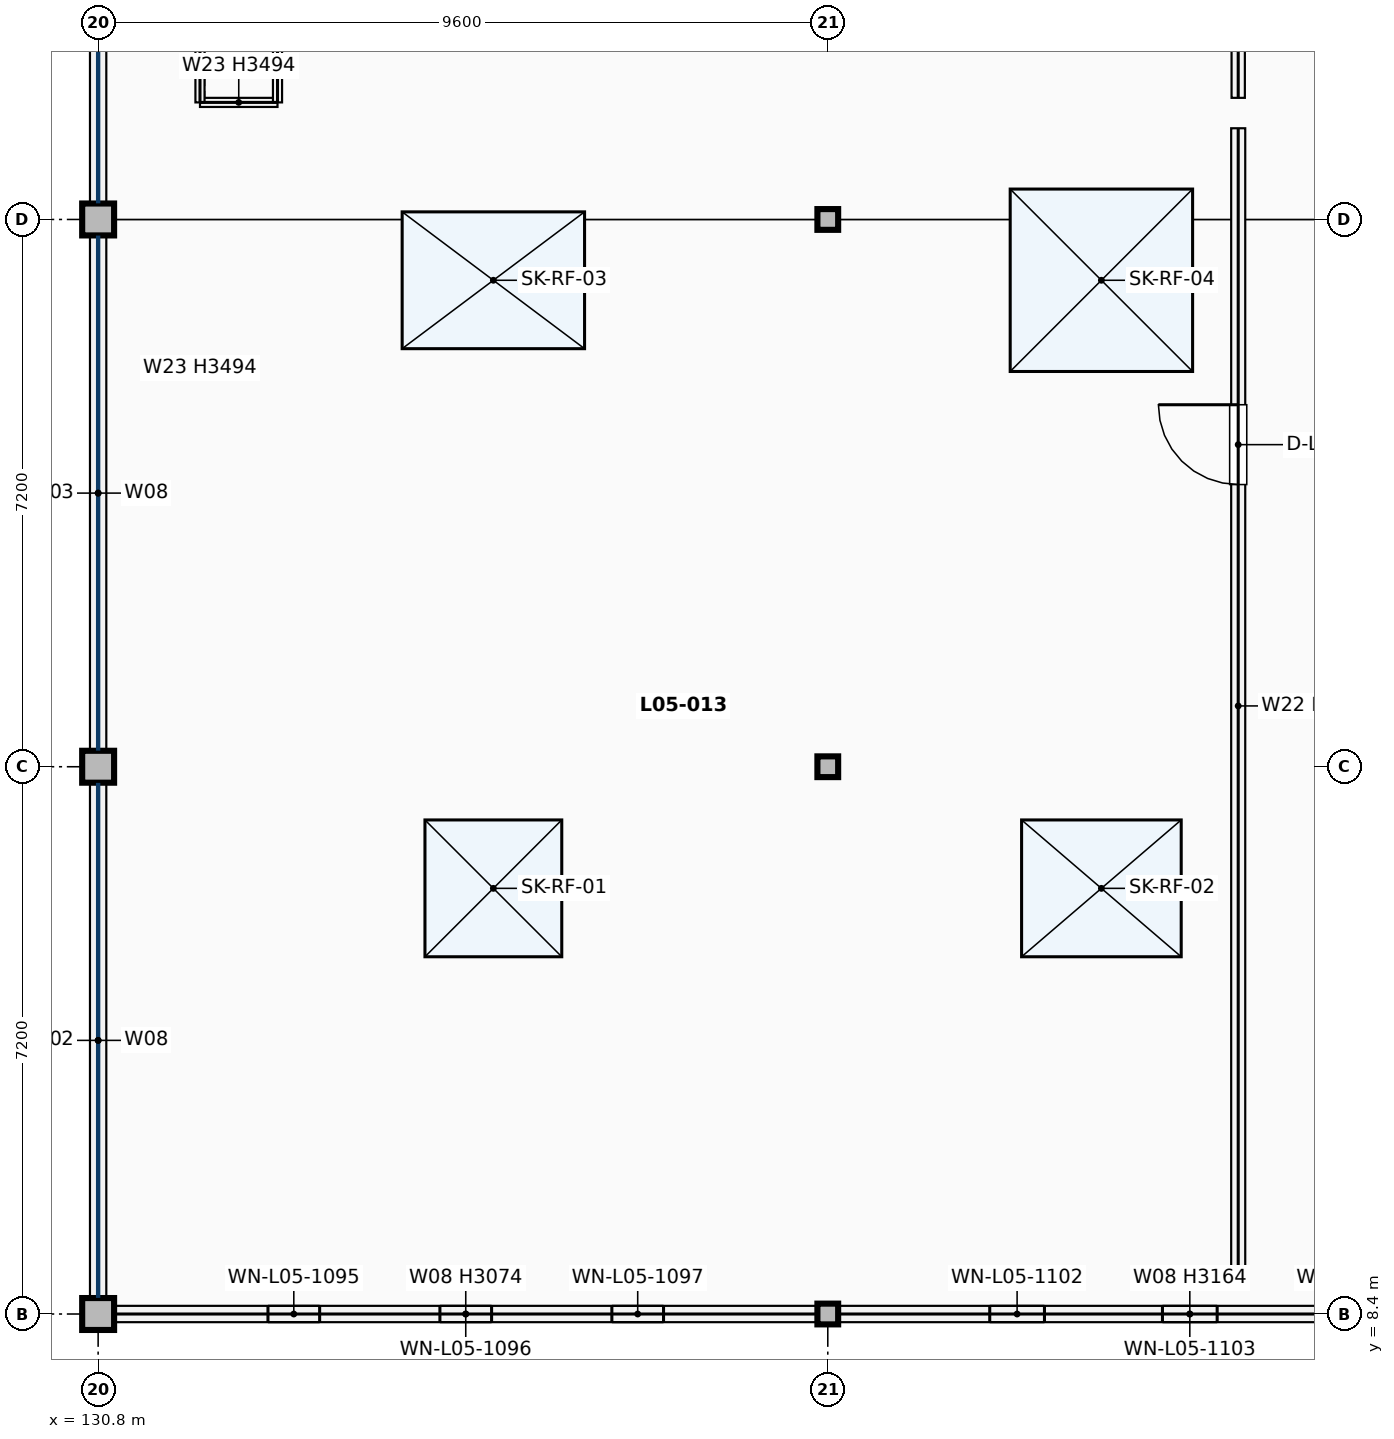
"""IFC4 building model, lengths in metres.
Left out: names, types, materials, properties, quantities, classifications, styles, units other than length and angle.
Written with IfcOpenShell. Run it as: python <this file> out.ifc"""

import sys

from ifc_helpers import new_model, si_unit, direction, frame, frame_2d, origin, origin_2d, place, context, subcontext, project, spatial, rectangle, hollow_circle, extrude, element, fill, save


model = new_model("IFC4")
c1 = context("Model", 3, precision=1e-05, world=origin(), true_north=direction((0.0, 1.0)))
c2 = subcontext(c1, "Body", "Model", "MODEL_VIEW")
j1 = project(units=[si_unit("LENGTHUNIT", "METRE"), si_unit("PLANEANGLEUNIT", "RADIAN")], contexts=[c1])
p1 = place(None, origin())
s1 = spatial("IfcSite", under=j1, at=p1, CompositionType="ELEMENT")
p2 = place(p1, origin())
s2 = spatial("IfcBuilding", under=s1, at=p2, CompositionType="ELEMENT")
p3 = place(p2, frame((0.0, 0.0, 21.08)))
s3 = spatial("IfcBuildingStorey", under=s2, at=p3, CompositionType="ELEMENT", Elevation=21.08)
for number, where, z_axis, x_axis in (
    (1, (130.8, 8.4, 0.0), (0.0, 0.0, 1.0), (1.0, 0.0, 0.0)),
    (2, (130.8, 15.6, 0.0), (0.0, 0.0, 1.0), (1.0, 0.0, 0.0)),
    (3, (130.8, 22.8, 0.0), (0.0, 0.0, 1.0), (1.0, 0.0, 0.0)),
):
    element("IfcColumn", number, at=place(p3, frame(where, z_axis=z_axis, x_axis=x_axis)), inside=s3, PredefinedType="COLUMN", context=c2, shape_type="SweptSolid", body=[
        extrude(rectangle(XDim=0.42, YDim=0.42, at=origin_2d()), origin(), (0.0, 0.0, 1.0), 3.74),
    ])
for number, where, z_axis, x_axis in (
    (4, (140.4, 8.4, 0.0), (0.0, 0.0, 1.0), (1.0, 0.0, 0.0)),
    (5, (140.4, 15.6, 0.0), (0.0, 0.0, 1.0), (1.0, 0.0, 0.0)),
    (6, (140.4, 22.8, 0.0), (0.0, 0.0, 1.0), (1.0, 0.0, 0.0)),
):
    element("IfcColumn", number, at=place(p3, frame(where, z_axis=z_axis, x_axis=x_axis)), inside=s3, PredefinedType="COLUMN", context=c2, shape_type="SweptSolid", body=[
        extrude(hollow_circle(Radius=0.136, WallThickness=0.012, at=origin_2d()), origin(), (0.0, 0.0, 1.0), 3.7),
    ])
for number, where, z_axis, x_axis in (
    (7, (130.8, 8.612, 0.0), (0.0, 0.0, 1.0), (0.0, 1.0, 0.0)),
    (8, (130.8, 15.812, 0.0), (0.0, 0.0, 1.0), (0.0, 1.0, 0.0)),
):
    element("IfcWall", number, at=place(p3, frame(where, z_axis=z_axis, x_axis=x_axis)), inside=s3, PredefinedType="SOLIDWALL", context=c2, shape_type="SweptSolid", body=[
        extrude(rectangle(XDim=6.776, YDim=0.215, at=frame_2d((3.388, 0.0))), origin(), (0.0, 0.0, 1.0), 0.85),
    ])
p4 = place(p3, frame((130.8, 23.012, 0.0), z_axis=(0.0, 0.0, 1.0), x_axis=(0.0, 1.0, 0.0)))
e9 = element("IfcWall", 9, at=p4, inside=s3, PredefinedType="SOLIDWALL", context=c2, shape_type="SweptSolid", body=[
    extrude(rectangle(XDim=6.776, YDim=0.215, at=frame_2d((3.388, 0.0))), origin(), (0.0, 0.0, 1.0), 0.85),
])
p5 = place(p3, frame((131.012, 8.4, 0.0), z_axis=(0.0, 0.0, 1.0), x_axis=(1.0, 0.0, 0.0)))
e10 = element("IfcWall", 10, at=p5, inside=s3, PredefinedType="SOLIDWALL", context=c2, shape_type="SweptSolid", body=[
    extrude(rectangle(XDim=9.25, YDim=0.215, at=frame_2d((4.625, 0.0))), origin(), (0.0, 0.0, 1.0), 3.074),
])
p6 = place(p5, frame((2.022, 0.0, 0.75)))
e11 = element("IfcOpeningElement", 11, at=p6, cuts=e10, PredefinedType="OPENING", context=c2, shape_type="SweptSolid", body=[
    extrude(rectangle(XDim=0.68, YDim=1.96, at=frame_2d((0.34, 0.98))), frame((0.0, 0.118, 0.0), z_axis=(0.0, -1.0, 0.0), x_axis=(1.0, 0.0, 0.0)), (0.0, 0.0, 1.0), 0.235),
])
p7 = place(p5, frame((4.285, 0.0, 0.75)))
e12 = element("IfcOpeningElement", 12, at=p7, cuts=e10, PredefinedType="OPENING", context=c2, shape_type="SweptSolid", body=[
    extrude(rectangle(XDim=0.68, YDim=1.96, at=frame_2d((0.34, 0.98))), frame((0.0, 0.118, 0.0), z_axis=(0.0, -1.0, 0.0), x_axis=(1.0, 0.0, 0.0)), (0.0, 0.0, 1.0), 0.235),
])
p8 = place(p5, frame((6.547, 0.0, 0.75)))
e13 = element("IfcOpeningElement", 13, at=p8, cuts=e10, PredefinedType="OPENING", context=c2, shape_type="SweptSolid", body=[
    extrude(rectangle(XDim=0.68, YDim=1.96, at=frame_2d((0.34, 0.98))), frame((0.0, 0.118, 0.0), z_axis=(0.0, -1.0, 0.0), x_axis=(1.0, 0.0, 0.0)), (0.0, 0.0, 1.0), 0.235),
])
p9 = place(p3, frame((140.539, 8.4, 0.0), z_axis=(0.0, 0.0, 1.0), x_axis=(1.0, 0.0, 0.0)))
e14 = element("IfcWall", 14, at=p9, inside=s3, PredefinedType="SOLIDWALL", context=c2, shape_type="SweptSolid", body=[
    extrude(rectangle(XDim=9.25, YDim=0.215, at=frame_2d((4.625, 0.0))), origin(), (0.0, 0.0, 1.0), 3.164),
])
p10 = place(p9, frame((1.992, 0.0, 0.75)))
e15 = element("IfcOpeningElement", 15, at=p10, cuts=e14, PredefinedType="OPENING", context=c2, shape_type="SweptSolid", body=[
    extrude(rectangle(XDim=0.72, YDim=2.24, at=frame_2d((0.36, 1.12))), frame((0.0, 0.118, 0.0), z_axis=(0.0, -1.0, 0.0), x_axis=(1.0, 0.0, 0.0)), (0.0, 0.0, 1.0), 0.235),
])
p11 = place(p9, frame((4.265, 0.0, 0.75)))
e16 = element("IfcOpeningElement", 16, at=p11, cuts=e14, PredefinedType="OPENING", context=c2, shape_type="SweptSolid", body=[
    extrude(rectangle(XDim=0.72, YDim=2.24, at=frame_2d((0.36, 1.12))), frame((0.0, 0.118, 0.0), z_axis=(0.0, -1.0, 0.0), x_axis=(1.0, 0.0, 0.0)), (0.0, 0.0, 1.0), 0.235),
])
p12 = place(p9, frame((6.537, 0.0, 0.75)))
e17 = element("IfcOpeningElement", 17, at=p12, cuts=e14, PredefinedType="OPENING", context=c2, shape_type="SweptSolid", body=[
    extrude(rectangle(XDim=0.72, YDim=2.24, at=frame_2d((0.36, 1.12))), frame((0.0, 0.118, 0.0), z_axis=(0.0, -1.0, 0.0), x_axis=(1.0, 0.0, 0.0)), (0.0, 0.0, 1.0), 0.235),
])
for number, where, z_axis, x_axis in (
    (18, (132.14, 24.34, 0.0), (0.0, 0.0, 1.0), (1.0, 0.0, 0.0)),
    (19, (133.16, 24.34, 0.0), (0.0, 0.0, 1.0), (0.0, 1.0, 0.0)),
    (20, (132.14, 25.36, 0.0), (0.0, 0.0, 1.0), (0.0, -1.0, 0.0)),
):
    element("IfcWall", number, at=place(p3, frame(where, z_axis=z_axis, x_axis=x_axis)), inside=s3, PredefinedType="PARTITIONING", context=c2, shape_type="SweptSolid", body=[
        extrude(rectangle(XDim=1.02, YDim=0.12, at=frame_2d((0.51, 0.0))), origin(), (0.0, 0.0, 1.0), 3.494),
    ])
p13 = place(p3, frame((145.8, 8.8, 0.0), z_axis=(0.0, 0.0, 1.0), x_axis=(0.0, 1.0, 0.0)))
e21 = element("IfcWall", 21, at=p13, inside=s3, PredefinedType="PARTITIONING", context=c2, shape_type="SweptSolid", body=[
    extrude(rectangle(XDim=15.2, YDim=0.185, at=frame_2d((7.6, 0.0))), origin(), (0.0, 0.0, 1.0), 2.884),
])
p14 = place(p13, frame((10.512, 0.0, 0.0)))
e22 = element("IfcOpeningElement", 22, at=p14, cuts=e21, PredefinedType="OPENING", context=c2, shape_type="SweptSolid", body=[
    extrude(rectangle(XDim=1.05, YDim=2.15, at=frame_2d((0.525, 1.075))), frame((0.0, 0.103, 0.0), z_axis=(0.0, -1.0, 0.0), x_axis=(1.0, 0.0, 0.0)), (0.0, 0.0, 1.0), 0.205),
])
p15 = place(p3, frame((145.8, 24.4, 0.0), z_axis=(0.0, 0.0, 1.0), x_axis=(0.0, 1.0, 0.0)))
e23 = element("IfcWall", 23, at=p15, inside=s3, PredefinedType="PARTITIONING", context=c2, shape_type="SweptSolid", body=[
    extrude(rectangle(XDim=19.6, YDim=0.175, at=frame_2d((9.8, 0.0))), origin(), (0.0, 0.0, 1.0), 2.884),
])
p16 = place(p15, frame((16.076, 0.0, 0.0)))
e24 = element("IfcOpeningElement", 24, at=p16, cuts=e23, PredefinedType="OPENING", context=c2, shape_type="SweptSolid", body=[
    extrude(rectangle(XDim=1.56, YDim=2.3, at=frame_2d((0.78, 1.15))), frame((0.0, 0.098, 0.0), z_axis=(0.0, -1.0, 0.0), x_axis=(1.0, 0.0, 0.0)), (0.0, 0.0, 1.0), 0.195),
])
p17 = place(p6, origin())
e25 = element("IfcWindow", 25, at=p17, inside=s3, PartitioningType="SINGLE_PANEL", PredefinedType="WINDOW", context=c2, shape_type="SweptSolid", body=[
    extrude(rectangle(XDim=0.68, YDim=1.96, at=frame_2d((0.34, 0.98))), frame((0.0, 0.03, 0.0), z_axis=(0.0, -1.0, 0.0), x_axis=(1.0, 0.0, 0.0)), (0.0, 0.0, 1.0), 0.06),
])
fill(e11, e25)
p18 = place(p7, origin())
e26 = element("IfcWindow", 26, at=p18, inside=s3, PartitioningType="SINGLE_PANEL", PredefinedType="WINDOW", context=c2, shape_type="SweptSolid", body=[
    extrude(rectangle(XDim=0.68, YDim=1.96, at=frame_2d((0.34, 0.98))), frame((0.0, 0.03, 0.0), z_axis=(0.0, -1.0, 0.0), x_axis=(1.0, 0.0, 0.0)), (0.0, 0.0, 1.0), 0.06),
])
fill(e12, e26)
p19 = place(p8, origin())
e27 = element("IfcWindow", 27, at=p19, inside=s3, PartitioningType="SINGLE_PANEL", PredefinedType="WINDOW", context=c2, shape_type="SweptSolid", body=[
    extrude(rectangle(XDim=0.68, YDim=1.96, at=frame_2d((0.34, 0.98))), frame((0.0, 0.03, 0.0), z_axis=(0.0, -1.0, 0.0), x_axis=(1.0, 0.0, 0.0)), (0.0, 0.0, 1.0), 0.06),
])
fill(e13, e27)
p20 = place(p10, origin())
e28 = element("IfcWindow", 28, at=p20, inside=s3, PartitioningType="SINGLE_PANEL", PredefinedType="WINDOW", context=c2, shape_type="SweptSolid", body=[
    extrude(rectangle(XDim=0.72, YDim=2.24, at=frame_2d((0.36, 1.12))), frame((0.0, 0.03, 0.0), z_axis=(0.0, -1.0, 0.0), x_axis=(1.0, 0.0, 0.0)), (0.0, 0.0, 1.0), 0.06),
])
fill(e15, e28)
p21 = place(p11, origin())
e29 = element("IfcWindow", 29, at=p21, inside=s3, PartitioningType="SINGLE_PANEL", PredefinedType="WINDOW", context=c2, shape_type="SweptSolid", body=[
    extrude(rectangle(XDim=0.72, YDim=2.24, at=frame_2d((0.36, 1.12))), frame((0.0, 0.03, 0.0), z_axis=(0.0, -1.0, 0.0), x_axis=(1.0, 0.0, 0.0)), (0.0, 0.0, 1.0), 0.06),
])
fill(e16, e29)
p22 = place(p2, frame((0.0, 0.0, 24.82)))
p23 = place(p22, frame((0.0, 0.0, -0.18)))
p24 = place(p23, frame((136.0, 14.0, 0.12)))
e30 = element("IfcWindow", 30, at=p24, inside=s3, PartitioningType="SINGLE_PANEL", PredefinedType="SKYLIGHT", context=c2, shape_type="SweptSolid", body=[
    extrude(rectangle(XDim=1.8, YDim=1.8, at=origin_2d()), origin(), (0.0, 0.0, 1.0), 0.06),
])
p25 = place(p23, frame((144.0, 14.0, 0.12)))
e31 = element("IfcWindow", 31, at=p25, inside=s3, PartitioningType="SINGLE_PANEL", PredefinedType="SKYLIGHT", context=c2, shape_type="SweptSolid", body=[
    extrude(rectangle(XDim=2.1, YDim=1.8, at=origin_2d()), origin(), (0.0, 0.0, 1.0), 0.06),
])
p26 = place(p23, frame((136.0, 22.0, 0.12)))
e32 = element("IfcWindow", 32, at=p26, inside=s3, PartitioningType="SINGLE_PANEL", PredefinedType="SKYLIGHT", context=c2, shape_type="SweptSolid", body=[
    extrude(rectangle(XDim=2.4, YDim=1.8, at=origin_2d()), origin(), (0.0, 0.0, 1.0), 0.06),
])
p27 = place(p23, frame((144.0, 22.0, 0.12)))
e33 = element("IfcWindow", 33, at=p27, inside=s3, PartitioningType="SINGLE_PANEL", PredefinedType="SKYLIGHT", context=c2, shape_type="SweptSolid", body=[
    extrude(rectangle(XDim=2.4, YDim=2.4, at=origin_2d()), origin(), (0.0, 0.0, 1.0), 0.06),
])
p28 = place(p14, origin())
e34 = element("IfcDoor", 34, at=p28, inside=s3, OperationType="SINGLE_SWING_RIGHT", PredefinedType="DOOR", context=c2, shape_type="SweptSolid", body=[
    extrude(rectangle(XDim=1.05, YDim=2.15, at=frame_2d((0.525, 1.075))), frame((0.0, 0.025, 0.0), z_axis=(0.0, -1.0, 0.0), x_axis=(1.0, 0.0, 0.0)), (0.0, 0.0, 1.0), 0.05),
])
fill(e22, e34)
save(model, sys.argv[1])
